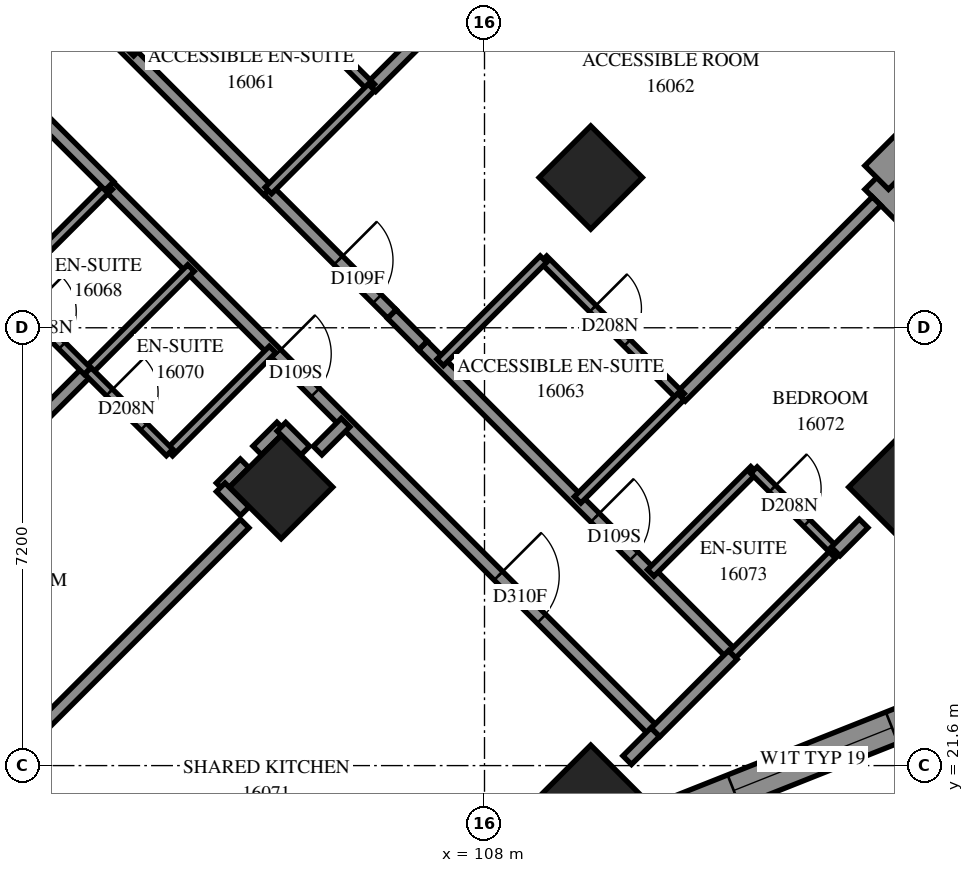
"""IFC4 building model, lengths in metres.
Left out: names, types, materials, properties, quantities, classifications, styles, units other than length and angle.
Written with IfcOpenShell. Run it as: python <this file> out.ifc"""

import sys

from ifc_helpers import new_model, si_unit, direction, frame, frame_2d, origin, origin_2d, place, context, subcontext, project, spatial, polyline, rectangle, outline, extrude, element, fill, save


model = new_model("IFC4")
c1 = context("Model", 3, precision=1e-05, world=origin(), true_north=direction((0.0, 1.0)))
c2 = subcontext(c1, "Body", "Model", "MODEL_VIEW")
j1 = project(units=[si_unit("LENGTHUNIT", "METRE"), si_unit("PLANEANGLEUNIT", "RADIAN")], contexts=[c1])
p1 = place(None, origin())
s1 = spatial("IfcSite", under=j1, at=p1, CompositionType="ELEMENT")
p2 = place(p1, origin())
s2 = spatial("IfcBuilding", under=s1, at=p2, CompositionType="ELEMENT")
p3 = place(p2, frame((0.0, 0.0, 61.0)))
s3 = spatial("IfcBuildingStorey", under=s2, at=p3, CompositionType="ELEMENT", Elevation=61.0)
for number, where, z_axis, x_axis in (
    (1, (109.747, 31.271, 0.0), (0.0, 0.0, 1.0), (0.707, -0.707, 0.0)),
    (2, (104.656, 26.18, 0.0), (0.0, 0.0, 1.0), (0.707, -0.707, 0.0)),
    (3, (114.838, 26.18, 0.0), (0.0, 0.0, 1.0), (0.707, -0.707, 0.0)),
    (4, (109.747, 21.088, 0.0), (0.0, 0.0, 1.0), (0.707, -0.707, 0.0)),
):
    element("IfcColumn", number, at=place(p3, frame(where, z_axis=z_axis, x_axis=x_axis)), inside=s3, PredefinedType="COLUMN", context=c2, shape_type="SweptSolid", body=[
        extrude(rectangle(XDim=1.2, YDim=1.2, at=origin_2d()), origin(), (0.0, 0.0, 1.0), 3.1),
    ])
p4 = place(p3, frame((110.948, 20.733, 0.0), z_axis=(0.0, 0.0, 1.0), x_axis=(0.9293292169, 0.3692522262, 0.0)))
e5 = element("IfcWall", 5, at=p4, inside=s3, PredefinedType="SOLIDWALL", context=c2, shape_type="SweptSolid", body=[
    extrude(outline(polyline([(0.119, -0.275), (5.674, -0.275), (5.426, 0.275), (-0.119, 0.275), (0.119, -0.275)])), origin(), (0.0, 0.0, 1.0), 3.1),
])
p5 = place(p4, frame((1.238, 0.0, 0.5)))
e6 = element("IfcOpeningElement", 6, at=p5, cuts=e5, PredefinedType="OPENING", context=c2, shape_type="SweptSolid", body=[
    extrude(rectangle(XDim=2.8, YDim=2.45, at=frame_2d((1.4, 1.225))), frame((0.0, 0.285, 0.0), z_axis=(0.0, -1.0, 0.0), x_axis=(1.0, 0.0, 0.0)), (0.0, 0.0, 1.0), 0.57),
])
p6 = place(p3, frame((117.914, 27.805, 0.0), z_axis=(0.0, 0.0, 1.0), x_axis=(-0.7071067812, 0.7071067812, 0.0)))
e7 = element("IfcWall", 7, at=p6, inside=s3, PredefinedType="SOLIDWALL", context=c2, shape_type="SweptSolid", body=[
    extrude(outline(polyline([(-0.174, -0.275), (4.625, -0.275), (5.175, 0.275), (0.174, 0.275), (-0.174, -0.275)])), origin(), (0.0, 0.0, 1.0), 3.1),
])
p7 = place(p6, frame((1.963, 0.0, 0.6)))
e8 = element("IfcOpeningElement", 8, at=p7, cuts=e7, PredefinedType="OPENING", context=c2, shape_type="SweptSolid", body=[
    extrude(rectangle(XDim=1.8, YDim=1.9, at=frame_2d((0.9, 0.95))), frame((0.0, 0.285, 0.0), z_axis=(0.0, -1.0, 0.0), x_axis=(1.0, 0.0, 0.0)), (0.0, 0.0, 1.0), 0.57),
])
p8 = place(p3, frame((114.449, 31.271, 0.0), z_axis=(0.0, 0.0, 1.0), x_axis=(0.7070982928, 0.7071152695, 0.0)))
e9 = element("IfcWall", 9, at=p8, inside=s3, PredefinedType="SOLIDWALL", context=c2, shape_type="SweptSolid", body=[
    extrude(outline(polyline([(0.275, -0.275), (6.278, -0.275), (5.503, 0.275), (-0.275, 0.275), (0.275, -0.275)])), origin(), (0.0, 0.0, 1.0), 3.1),
])
p9 = place(p8, frame((1.137, 0.0, 0.6)))
e10 = element("IfcOpeningElement", 10, at=p9, cuts=e9, PredefinedType="OPENING", context=c2, shape_type="SweptSolid", body=[
    extrude(rectangle(XDim=1.8, YDim=1.9, at=frame_2d((0.9, 0.95))), frame((0.0, 0.285, 0.0), z_axis=(0.0, -1.0, 0.0), x_axis=(1.0, 0.0, 0.0)), (0.0, 0.0, 1.0), 0.57),
])
p10 = place(p8, frame((3.989, 0.0, 0.6)))
e11 = element("IfcOpeningElement", 11, at=p10, cuts=e9, PredefinedType="OPENING", context=c2, shape_type="SweptSolid", body=[
    extrude(rectangle(XDim=1.2, YDim=1.9, at=frame_2d((0.6, 0.95))), frame((0.0, 0.285, 0.0), z_axis=(0.0, -1.0, 0.0), x_axis=(1.0, 0.0, 0.0)), (0.0, 0.0, 1.0), 0.57),
])
p11 = place(p3, frame((101.825, 31.125, 0.0), z_axis=(0.0, 0.0, 1.0), x_axis=(0.7071067812, -0.7071067812, 0.0)))
e12 = element("IfcWall", 12, at=p11, inside=s3, PredefinedType="PARTITIONING", context=c2, shape_type="SweptSolid", body=[
    extrude(rectangle(XDim=12.7, YDim=0.2, at=frame_2d((6.35, 0.0))), origin(), (0.0, 0.0, 1.0), 3.1),
])
p12 = place(p11, frame((3.895, 0.0, 0.0)))
e13 = element("IfcOpeningElement", 13, at=p12, cuts=e12, PredefinedType="OPENING", context=c2, shape_type="SweptSolid", body=[
    extrude(rectangle(XDim=0.9, YDim=2.1, at=frame_2d((0.45, 1.05))), frame((0.0, 0.11, 0.0), z_axis=(0.0, -1.0, 0.0), x_axis=(1.0, 0.0, 0.0)), (0.0, 0.0, 1.0), 0.22),
])
p13 = place(p11, frame((9.056, 0.0, 0.0)))
e14 = element("IfcOpeningElement", 14, at=p13, cuts=e12, PredefinedType="OPENING", context=c2, shape_type="SweptSolid", body=[
    extrude(rectangle(XDim=1.0, YDim=2.1, at=frame_2d((0.5, 1.05))), frame((0.0, 0.11, 0.0), z_axis=(0.0, -1.0, 0.0), x_axis=(1.0, 0.0, 0.0)), (0.0, 0.0, 1.0), 0.22),
])
p14 = place(p3, frame((106.14, 32.756, 0.0), z_axis=(0.0, 0.0, 1.0), x_axis=(0.7071017243, 0.707111838, 0.0)))
e15 = element("IfcWall", 15, at=p14, inside=s3, PredefinedType="PARTITIONING", context=c2, shape_type="SweptSolid", body=[
    extrude(rectangle(XDim=9.887, YDim=0.2, at=frame_2d((4.944, 0.0))), origin(), (0.0, 0.0, 1.0), 3.1),
])
p15 = place(p3, frame((99.349, 36.147, 0.0), z_axis=(0.0, 0.0, 1.0), x_axis=(0.7071067812, -0.7071067812, 0.0)))
e16 = element("IfcWall", 16, at=p15, inside=s3, PredefinedType="PARTITIONING", context=c2, shape_type="SweptSolid", body=[
    extrude(rectangle(XDim=7.201, YDim=0.2, at=frame_2d((3.601, 0.0))), origin(), (0.0, 0.0, 1.0), 3.1),
])
p16 = place(p15, frame((2.358, 0.0, 0.0)))
e17 = element("IfcOpeningElement", 17, at=p16, cuts=e16, PredefinedType="OPENING", context=c2, shape_type="SweptSolid", body=[
    extrude(rectangle(XDim=0.9, YDim=2.1, at=frame_2d((0.45, 1.05))), frame((0.0, 0.11, 0.0), z_axis=(0.0, -1.0, 0.0), x_axis=(1.0, 0.0, 0.0)), (0.0, 0.0, 1.0), 0.22),
])
p17 = place(p3, frame((106.987, 28.509, 0.0), z_axis=(0.0, 0.0, 1.0), x_axis=(0.7071067812, -0.7071067812, 0.0)))
e18 = element("IfcWall", 18, at=p17, inside=s3, PredefinedType="PARTITIONING", context=c2, shape_type="SweptSolid", body=[
    extrude(rectangle(XDim=7.198, YDim=0.2, at=frame_2d((3.599, 0.0))), origin(), (0.0, 0.0, 1.0), 3.1),
])
p18 = place(p17, frame((4.004, 0.0, 0.0)))
e19 = element("IfcOpeningElement", 19, at=p18, cuts=e18, PredefinedType="OPENING", context=c2, shape_type="SweptSolid", body=[
    extrude(rectangle(XDim=0.9, YDim=2.1, at=frame_2d((0.45, 1.05))), frame((0.0, 0.11, 0.0), z_axis=(0.0, -1.0, 0.0), x_axis=(1.0, 0.0, 0.0)), (0.0, 0.0, 1.0), 0.22),
])
p19 = place(p3, frame((96.519, 23.136, 0.0), z_axis=(0.0, 0.0, 1.0), x_axis=(0.7071067812, 0.7071067812, 0.0)))
e20 = element("IfcWall", 20, at=p19, inside=s3, PredefinedType="PARTITIONING", context=c2, shape_type="SweptSolid", body=[
    extrude(rectangle(XDim=7.005, YDim=0.2, at=frame_2d((3.503, 0.0))), origin(), (0.0, 0.0, 1.0), 3.1),
])
p20 = place(p3, frame((100.163, 21.689, 0.0), z_axis=(0.0, 0.0, 1.0), x_axis=(0.7071067812, 0.7071067812, 0.0)))
e21 = element("IfcWall", 21, at=p20, inside=s3, PredefinedType="PARTITIONING", context=c2, shape_type="SweptSolid", body=[
    extrude(rectangle(XDim=5.504, YDim=0.2, at=frame_2d((2.752, 0.0))), origin(), (0.0, 0.0, 1.0), 3.1),
])
p21 = place(p3, frame((111.231, 27.665, 0.0), z_axis=(0.0, 0.0, 1.0), x_axis=(0.7071067812, 0.7071067812, 0.0)))
e22 = element("IfcWall", 22, at=p21, inside=s3, PredefinedType="PARTITIONING", context=c2, shape_type="SweptSolid", body=[
    extrude(rectangle(XDim=4.55, YDim=0.2, at=frame_2d((2.275, 0.0))), origin(), (0.0, 0.0, 1.0), 3.1),
])
p22 = place(p3, frame((108.97, 29.928, 0.0), z_axis=(0.0, 0.0, 1.0), x_axis=(0.7067942478, -0.7074191764, 0.0)))
e23 = element("IfcWall", 23, at=p22, inside=s3, PredefinedType="PARTITIONING", context=c2, shape_type="SweptSolid", body=[
    extrude(rectangle(XDim=3.2, YDim=0.15, at=frame_2d((1.6, 0.0))), origin(), (0.0, 0.0, 1.0), 3.1),
])
p23 = place(p22, frame((1.148, 0.0, 0.0)))
e24 = element("IfcOpeningElement", 24, at=p23, cuts=e23, PredefinedType="OPENING", context=c2, shape_type="SweptSolid", body=[
    extrude(rectangle(XDim=0.8, YDim=2.1, at=frame_2d((0.4, 1.05))), frame((0.0, 0.085, 0.0), z_axis=(0.0, -1.0, 0.0), x_axis=(1.0, 0.0, 0.0)), (0.0, 0.0, 1.0), 0.17),
])
p24 = place(p3, frame((103.875, 35.015, 0.0), z_axis=(0.0, 0.0, 1.0), x_axis=(0.7071067812, -0.7071067812, 0.0)))
e25 = element("IfcWall", 25, at=p24, inside=s3, PredefinedType="PARTITIONING", context=c2, shape_type="SweptSolid", body=[
    extrude(rectangle(XDim=3.199, YDim=0.15, at=frame_2d((1.599, 0.0))), origin(), (0.0, 0.0, 1.0), 3.1),
])
p25 = place(p24, frame((1.27, 0.0, 0.0)))
e26 = element("IfcOpeningElement", 26, at=p25, cuts=e25, PredefinedType="OPENING", context=c2, shape_type="SweptSolid", body=[
    extrude(rectangle(XDim=0.8, YDim=2.1, at=frame_2d((0.4, 1.05))), frame((0.0, 0.085, 0.0), z_axis=(0.0, -1.0, 0.0), x_axis=(1.0, 0.0, 0.0)), (0.0, 0.0, 1.0), 0.17),
])
p26 = place(p3, frame((104.445, 31.059, 0.0), z_axis=(0.0, 0.0, 1.0), x_axis=(0.7074545101, -0.7067588812, 0.0)))
e27 = element("IfcWall", 27, at=p26, inside=s3, PredefinedType="PARTITIONING", context=c2, shape_type="SweptSolid", body=[
    extrude(rectangle(XDim=2.875, YDim=0.2, at=frame_2d((1.438, 0.0))), origin(), (0.0, 0.0, 1.0), 3.1),
])
p27 = place(p26, frame((1.626, 0.0, 0.0)))
e28 = element("IfcOpeningElement", 28, at=p27, cuts=e27, PredefinedType="OPENING", context=c2, shape_type="SweptSolid", body=[
    extrude(rectangle(XDim=0.9, YDim=2.1, at=frame_2d((0.45, 1.05))), frame((0.0, 0.11, 0.0), z_axis=(0.0, -1.0, 0.0), x_axis=(1.0, 0.0, 0.0)), (0.0, 0.0, 1.0), 0.22),
])
for number, where, z_axis, x_axis in (
    (29, (107.271, 28.231, 0.0), (0.0, 0.0, 1.0), (0.707, 0.707, 0.0)),
    (30, (100.129, 29.433, 0.0), (0.0, 0.0, 1.0), (0.707, 0.707, 0.0)),
):
    element("IfcWall", number, at=place(p3, frame(where, z_axis=z_axis, x_axis=x_axis)), inside=s3, PredefinedType="PARTITIONING", context=c2, shape_type="SweptSolid", body=[
        extrude(rectangle(XDim=2.401, YDim=0.15, at=frame_2d((1.201, 0.0))), origin(), (0.0, 0.0, 1.0), 3.1),
    ])
p28 = place(p3, frame((104.445, 31.057, 0.0), z_axis=(0.0, 0.0, 1.0), x_axis=(0.706689978, 0.7075233388, 0.0)))
e31 = element("IfcWall", 31, at=p28, inside=s3, PredefinedType="PARTITIONING", context=c2, shape_type="SweptSolid", body=[
    extrude(rectangle(XDim=2.4, YDim=0.15, at=frame_2d((1.2, 0.0))), origin(), (0.0, 0.0, 1.0), 3.1),
])
p29 = place(p3, frame((112.077, 23.425, 0.0), z_axis=(0.0, 0.0, 1.0), x_axis=(0.7075233388, 0.706689978, 0.0)))
e32 = element("IfcWall", 32, at=p29, inside=s3, PredefinedType="PARTITIONING", context=c2, shape_type="SweptSolid", body=[
    extrude(rectangle(XDim=2.4, YDim=0.15, at=frame_2d((1.2, 0.0))), origin(), (0.0, 0.0, 1.0), 2.6),
])
for number, where, z_axis, x_axis in (
    (33, (101.477, 28.085, 0.0), (0.0, 0.0, 1.0), (0.707, 0.708, 0.0)),
    (34, (102.177, 33.325, 0.0), (0.0, 0.0, 1.0), (0.708, 0.707, 0.0)),
    (35, (109.531, 25.971, 0.0), (0.0, 0.0, 1.0), (0.708, 0.707, 0.0)),
    (36, (110.734, 24.768, 0.0), (0.0, 0.0, 1.0), (0.708, 0.707, 0.0)),
):
    element("IfcWall", number, at=place(p3, frame(where, z_axis=z_axis, x_axis=x_axis)), inside=s3, PredefinedType="PARTITIONING", context=c2, shape_type="SweptSolid", body=[
        extrude(rectangle(XDim=2.4, YDim=0.15, at=frame_2d((1.2, 0.0))), origin(), (0.0, 0.0, 1.0), 3.1),
    ])
p30 = place(p3, frame((102.817, 26.747, 0.0), z_axis=(0.0, 0.0, 1.0), x_axis=(0.7071067812, 0.7071067812, 0.0)))
e37 = element("IfcWall", 37, at=p30, inside=s3, PredefinedType="PARTITIONING", context=c2, shape_type="SweptSolid", body=[
    extrude(rectangle(XDim=2.398, YDim=0.15, at=frame_2d((1.199, 0.0))), origin(), (0.0, 0.0, 1.0), 3.1),
])
p31 = place(p3, frame((100.127, 29.429, 0.0), z_axis=(0.0, 0.0, 1.0), x_axis=(0.7071067812, -0.7071067812, 0.0)))
e38 = element("IfcWall", 38, at=p31, inside=s3, PredefinedType="PARTITIONING", context=c2, shape_type="SweptSolid", body=[
    extrude(rectangle(XDim=1.901, YDim=0.15, at=frame_2d((0.95, 0.0))), origin(), (0.0, 0.0, 1.0), 3.1),
])
p32 = place(p31, frame((0.508, 0.0, 0.0)))
e39 = element("IfcOpeningElement", 39, at=p32, cuts=e38, PredefinedType="OPENING", context=c2, shape_type="SweptSolid", body=[
    extrude(rectangle(XDim=0.8, YDim=2.1, at=frame_2d((0.4, 1.05))), frame((0.0, 0.085, 0.0), z_axis=(0.0, -1.0, 0.0), x_axis=(1.0, 0.0, 0.0)), (0.0, 0.0, 1.0), 0.17),
])
p33 = place(p3, frame((112.431, 26.459, 0.0), z_axis=(0.0, 0.0, 1.0), x_axis=(0.7071067812, -0.7071067812, 0.0)))
e40 = element("IfcWall", 40, at=p33, inside=s3, PredefinedType="PARTITIONING", context=c2, shape_type="SweptSolid", body=[
    extrude(rectangle(XDim=1.901, YDim=0.15, at=frame_2d((0.95, 0.0))), origin(), (0.0, 0.0, 1.0), 3.1),
])
p34 = place(p33, frame((0.431, 0.0, 0.0)))
e41 = element("IfcOpeningElement", 41, at=p34, cuts=e40, PredefinedType="OPENING", context=c2, shape_type="SweptSolid", body=[
    extrude(rectangle(XDim=0.8, YDim=2.1, at=frame_2d((0.4, 1.05))), frame((0.0, 0.085, 0.0), z_axis=(0.0, -1.0, 0.0), x_axis=(1.0, 0.0, 0.0)), (0.0, 0.0, 1.0), 0.17),
])
p35 = place(p3, frame((101.477, 28.091, 0.0), z_axis=(0.0, 0.0, 1.0), x_axis=(0.7076330979, -0.7065800724, 0.0)))
e42 = element("IfcWall", 42, at=p35, inside=s3, PredefinedType="PARTITIONING", context=c2, shape_type="SweptSolid", body=[
    extrude(rectangle(XDim=1.899, YDim=0.15, at=frame_2d((0.95, 0.0))), origin(), (0.0, 0.0, 1.0), 3.1),
])
p36 = place(p35, frame((0.501, 0.0, 0.0)))
e43 = element("IfcOpeningElement", 43, at=p36, cuts=e42, PredefinedType="OPENING", context=c2, shape_type="SweptSolid", body=[
    extrude(rectangle(XDim=0.8, YDim=2.1, at=frame_2d((0.4, 1.05))), frame((0.0, 0.085, 0.0), z_axis=(0.0, -1.0, 0.0), x_axis=(1.0, 0.0, 0.0)), (0.0, 0.0, 1.0), 0.17),
])
p37 = place(p3, frame((110.811, 22.145, 0.0), z_axis=(0.0, 0.0, 1.0), x_axis=(0.7065510983, 0.7076620277, 0.0)))
e44 = element("IfcWall", 44, at=p37, inside=s3, PredefinedType="PARTITIONING", context=c2, shape_type="SweptSolid", body=[
    extrude(rectangle(XDim=1.8, YDim=0.2, at=frame_2d((0.9, 0.0))), origin(), (0.0, 0.0, 1.0), 2.6),
])
p38 = place(p3, frame((100.629, 32.335, 0.0), z_axis=(0.0, 0.0, 1.0), x_axis=(0.7071067812, -0.7071067812, 0.0)))
e45 = element("IfcWall", 45, at=p38, inside=s3, PredefinedType="PARTITIONING", context=c2, shape_type="SweptSolid", body=[
    extrude(rectangle(XDim=1.7, YDim=0.2, at=frame_2d((0.85, 0.0))), origin(), (0.0, 0.0, 1.0), 3.1),
])
p39 = place(p3, frame((106.476, 29.024, 0.0), z_axis=(0.0, 0.0, 1.0), x_axis=(0.7057270646, -0.7084838109, 0.0)))
e46 = element("IfcWall", 46, at=p39, inside=s3, PredefinedType="PARTITIONING", context=c2, shape_type="SweptSolid", body=[
    extrude(rectangle(XDim=0.726, YDim=0.2, at=frame_2d((0.363, 0.0))), origin(), (0.0, 0.0, 1.0), 3.1),
])
p40 = place(p3, frame((113.775, 25.122, 0.0), z_axis=(0.0, 0.0, 1.0), x_axis=(0.705571267, 0.7086389682, 0.0)))
e47 = element("IfcWall", 47, at=p40, inside=s3, PredefinedType="PARTITIONING", context=c2, shape_type="SweptSolid", body=[
    extrude(rectangle(XDim=0.652, YDim=0.2, at=frame_2d((0.326, 0.0))), origin(), (0.0, 0.0, 1.0), 2.6),
])
p41 = place(p3, frame((110.347, 21.689, 0.0), z_axis=(0.0, 0.0, 1.0), x_axis=(0.7071067812, 0.7071067812, 0.0)))
e48 = element("IfcWall", 48, at=p41, inside=s3, PredefinedType="PARTITIONING", context=c2, shape_type="SweptSolid", body=[
    extrude(rectangle(XDim=0.65, YDim=0.2, at=frame_2d((0.325, 0.0))), origin(), (0.0, 0.0, 1.0), 2.6),
])
p42 = place(p3, frame((105.255, 26.781, 0.0), z_axis=(0.0, 0.0, 1.0), x_axis=(0.7071067812, 0.7071067812, 0.0)))
e49 = element("IfcWall", 49, at=p42, inside=s3, PredefinedType="PARTITIONING", context=c2, shape_type="SweptSolid", body=[
    extrude(rectangle(XDim=0.65, YDim=0.2, at=frame_2d((0.325, 0.0))), origin(), (0.0, 0.0, 1.0), 3.1),
])
for number, where, z_axis, x_axis in (
    (50, (103.661, 26.177, 0.0), (0.0, 0.0, 1.0), (0.707, 0.707, 0.0)),
    (51, (103.662, 26.177, 0.0), (0.0, 0.0, 1.0), (0.707, -0.707, 0.0)),
):
    element("IfcWall", number, at=place(p3, frame(where, z_axis=z_axis, x_axis=x_axis)), inside=s3, PredefinedType="PARTITIONING", context=c2, shape_type="SweptSolid", body=[
        extrude(rectangle(XDim=0.557, YDim=0.2, at=frame_2d((0.279, 0.0))), origin(), (0.0, 0.0, 1.0), 3.1),
    ])
p43 = place(p3, frame((104.263, 26.784, 0.0), z_axis=(0.0, 0.0, 1.0), x_axis=(0.7089037401, 0.705305244, 0.0)))
e52 = element("IfcWall", 52, at=p43, inside=s3, PredefinedType="PARTITIONING", context=c2, shape_type="SweptSolid", body=[
    extrude(rectangle(XDim=0.556, YDim=0.2, at=frame_2d((0.278, 0.0))), origin(), (0.0, 0.0, 1.0), 3.1),
])
p44 = place(p3, frame((104.66, 27.172, 0.0), z_axis=(0.0, 0.0, 1.0), x_axis=(0.7071067812, -0.7071067812, 0.0)))
e53 = element("IfcWall", 53, at=p44, inside=s3, PredefinedType="PARTITIONING", context=c2, shape_type="SweptSolid", body=[
    extrude(rectangle(XDim=0.554, YDim=0.2, at=frame_2d((0.277, 0.0))), origin(), (0.0, 0.0, 1.0), 3.1),
])
p45 = place(p5, origin())
e54 = element("IfcWindow", 54, at=p45, inside=s3, PartitioningType="SINGLE_PANEL", PredefinedType="WINDOW", context=c2, shape_type="SweptSolid", body=[
    extrude(rectangle(XDim=2.8, YDim=2.45, at=frame_2d((1.4, 1.225))), frame((0.0, 0.155, 0.0), z_axis=(0.0, -1.0, 0.0), x_axis=(1.0, 0.0, 0.0)), (0.0, 0.0, 1.0), 0.06),
])
fill(e6, e54)
p46 = place(p27, origin())
e55 = element("IfcDoor", 55, at=p46, inside=s3, OperationType="SINGLE_SWING_RIGHT", PredefinedType="DOOR", context=c2, shape_type="SweptSolid", body=[
    extrude(rectangle(XDim=0.9, YDim=2.1, at=frame_2d((0.45, 1.05))), frame((0.0, 0.025, 0.0), z_axis=(0.0, -1.0, 0.0), x_axis=(1.0, 0.0, 0.0)), (0.0, 0.0, 1.0), 0.05),
])
fill(e28, e55)
p47 = place(p23, origin())
e56 = element("IfcDoor", 56, at=p47, inside=s3, OperationType="SINGLE_SWING_RIGHT", PredefinedType="DOOR", context=c2, shape_type="SweptSolid", body=[
    extrude(rectangle(XDim=0.8, YDim=2.1, at=frame_2d((0.4, 1.05))), frame((0.0, 0.025, 0.0), z_axis=(0.0, -1.0, 0.0), x_axis=(1.0, 0.0, 0.0)), (0.0, 0.0, 1.0), 0.05),
])
fill(e24, e56)
p48 = place(p32, origin())
e57 = element("IfcDoor", 57, at=p48, inside=s3, OperationType="SINGLE_SWING_RIGHT", PredefinedType="DOOR", context=c2, shape_type="SweptSolid", body=[
    extrude(rectangle(XDim=0.8, YDim=2.1, at=frame_2d((0.4, 1.05))), frame((0.0, 0.025, 0.0), z_axis=(0.0, -1.0, 0.0), x_axis=(1.0, 0.0, 0.0)), (0.0, 0.0, 1.0), 0.05),
])
fill(e39, e57)
p49 = place(p12, origin())
e58 = element("IfcDoor", 58, at=p49, inside=s3, OperationType="SINGLE_SWING_LEFT", PredefinedType="DOOR", context=c2, shape_type="SweptSolid", body=[
    extrude(rectangle(XDim=0.9, YDim=2.1, at=frame_2d((0.45, 1.05))), frame((0.0, 0.025, 0.0), z_axis=(0.0, -1.0, 0.0), x_axis=(1.0, 0.0, 0.0)), (0.0, 0.0, 1.0), 0.05),
])
fill(e13, e58)
p50 = place(p36, origin())
e59 = element("IfcDoor", 59, at=p50, inside=s3, OperationType="SINGLE_SWING_RIGHT", PredefinedType="DOOR", context=c2, shape_type="SweptSolid", body=[
    extrude(rectangle(XDim=0.8, YDim=2.1, at=frame_2d((0.4, 1.05))), frame((0.0, 0.025, 0.0), z_axis=(0.0, -1.0, 0.0), x_axis=(1.0, 0.0, 0.0)), (0.0, 0.0, 1.0), 0.05),
])
fill(e43, e59)
p51 = place(p13, origin())
e60 = element("IfcDoor", 60, at=p51, inside=s3, OperationType="SINGLE_SWING_RIGHT", PredefinedType="DOOR", context=c2, shape_type="SweptSolid", body=[
    extrude(rectangle(XDim=1.0, YDim=2.1, at=frame_2d((0.5, 1.05))), frame((0.0, 0.025, 0.0), z_axis=(0.0, -1.0, 0.0), x_axis=(1.0, 0.0, 0.0)), (0.0, 0.0, 1.0), 0.05),
])
fill(e14, e60)
p52 = place(p18, origin())
e61 = element("IfcDoor", 61, at=p52, inside=s3, OperationType="SINGLE_SWING_RIGHT", PredefinedType="DOOR", context=c2, shape_type="SweptSolid", body=[
    extrude(rectangle(XDim=0.9, YDim=2.1, at=frame_2d((0.45, 1.05))), frame((0.0, 0.025, 0.0), z_axis=(0.0, -1.0, 0.0), x_axis=(1.0, 0.0, 0.0)), (0.0, 0.0, 1.0), 0.05),
])
fill(e19, e61)
p53 = place(p34, origin())
e62 = element("IfcDoor", 62, at=p53, inside=s3, OperationType="SINGLE_SWING_RIGHT", PredefinedType="DOOR", context=c2, shape_type="SweptSolid", body=[
    extrude(rectangle(XDim=0.8, YDim=2.1, at=frame_2d((0.4, 1.05))), frame((0.0, 0.025, 0.0), z_axis=(0.0, -1.0, 0.0), x_axis=(1.0, 0.0, 0.0)), (0.0, 0.0, 1.0), 0.05),
])
fill(e41, e62)
save(model, sys.argv[1])
